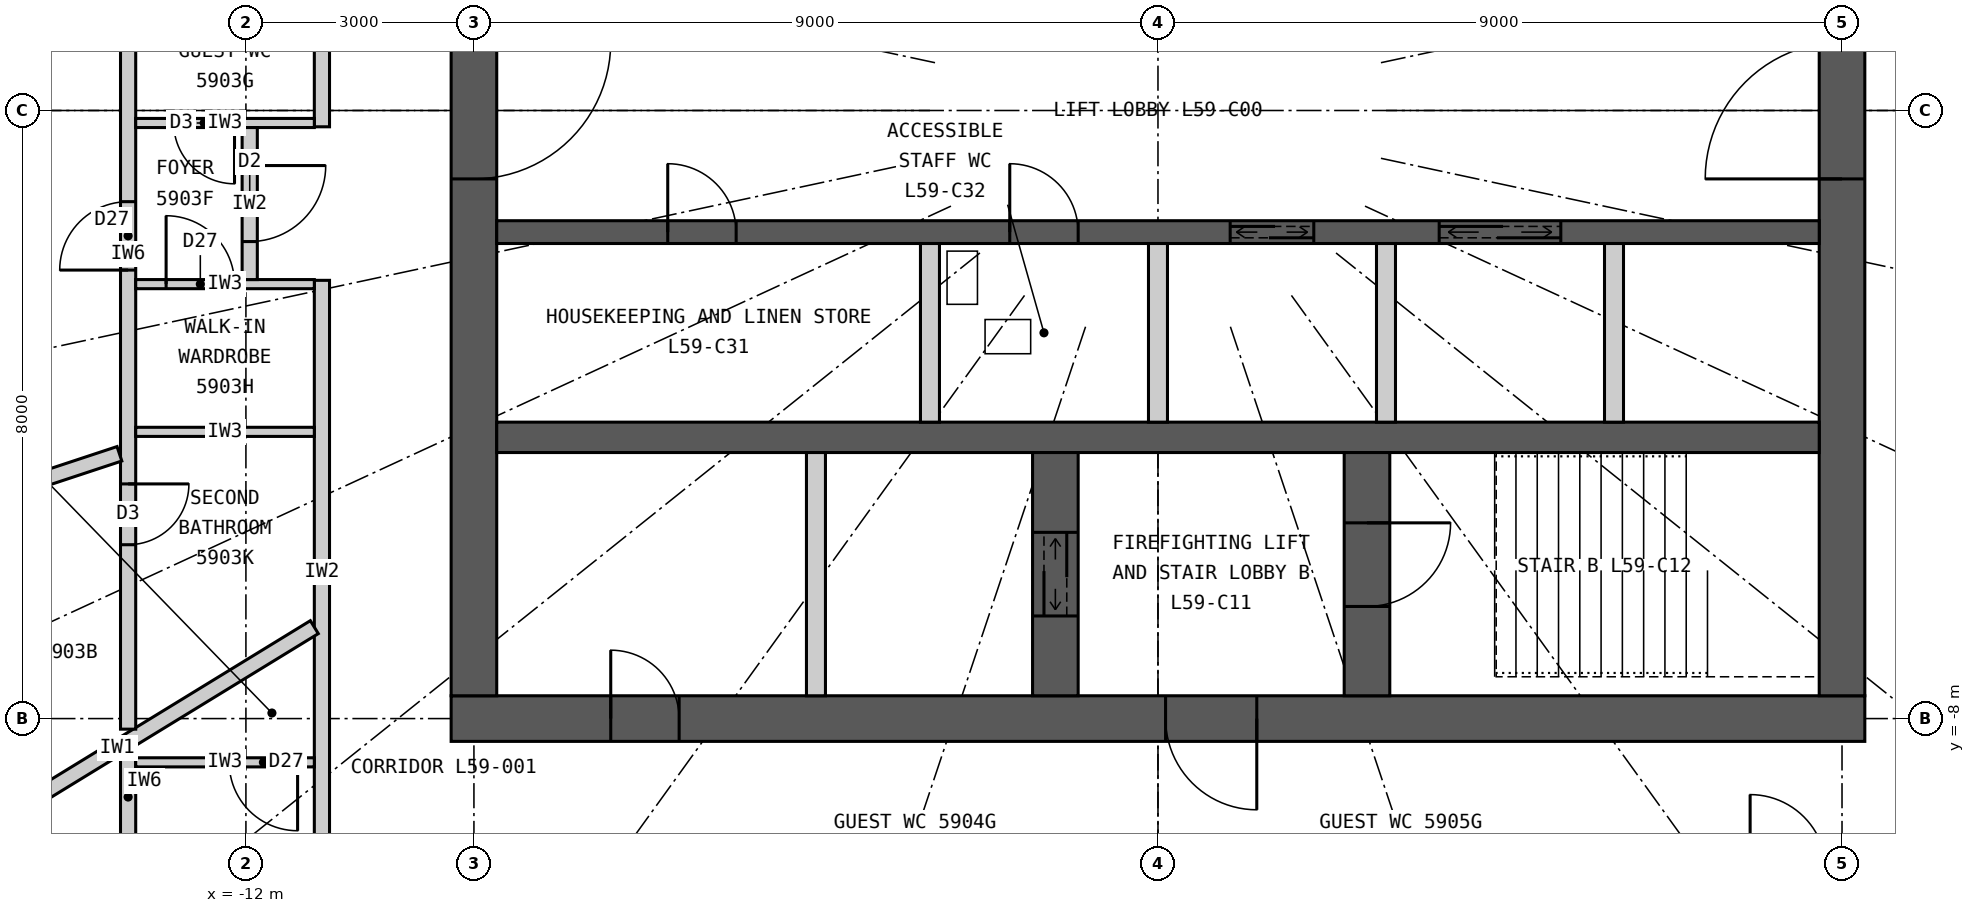
"""IFC4 building model, lengths in metres.
Left out: names, types, materials, properties, quantities, classifications, styles, units other than length and angle.
Written with IfcOpenShell. Run it as: python <this file> out.ifc"""

import sys

from ifc_helpers import new_model, si_unit, direction, frame, frame_2d, origin, place, context, subcontext, project, spatial, rectangle, extrude, element, fill, save


model = new_model("IFC4")
c1 = context("Model", 3, precision=1e-05, world=origin(), true_north=direction((0.0, 1.0)))
c2 = subcontext(c1, "Body", "Model", "MODEL_VIEW")
j1 = project(units=[si_unit("LENGTHUNIT", "METRE"), si_unit("PLANEANGLEUNIT", "RADIAN")], contexts=[c1])
p1 = place(None, origin())
s1 = spatial("IfcSite", under=j1, at=p1, CompositionType="ELEMENT")
p2 = place(p1, origin())
s2 = spatial("IfcBuilding", under=s1, at=p2, CompositionType="ELEMENT")
p3 = place(p2, frame((0.0, 0.0, 219.3)))
s3 = spatial("IfcBuildingStorey", under=s2, at=p3, CompositionType="ELEMENT", Elevation=219.3)
p4 = place(p3, frame((9.3, -8.0, 0.0), z_axis=(0.0, 0.0, 1.0), x_axis=(-1.0, 0.0, 0.0)))
e1 = element("IfcWall", 1, at=p4, inside=s3, PredefinedType="SHEAR", context=c2, shape_type="SweptSolid", body=[
    extrude(rectangle(XDim=18.6, YDim=0.6, at=frame_2d((9.3, 0.0))), origin(), (0.0, 0.0, 1.0), 3.3),
])
p5 = place(p4, frame((8.0, 0.0, 0.0)))
e2 = element("IfcOpeningElement", 2, at=p5, cuts=e1, PredefinedType="OPENING", context=c2, shape_type="SweptSolid", body=[
    extrude(rectangle(XDim=1.2, YDim=2.2, at=frame_2d((0.6, 1.1))), frame((0.0, 0.31, 0.0), z_axis=(0.0, -1.0, 0.0), x_axis=(1.0, 0.0, 0.0)), (0.0, 0.0, 1.0), 0.62),
])
p6 = place(p4, frame((15.6, 0.0, 0.0)))
e3 = element("IfcOpeningElement", 3, at=p6, cuts=e1, PredefinedType="OPENING", context=c2, shape_type="SweptSolid", body=[
    extrude(rectangle(XDim=0.9, YDim=2.2, at=frame_2d((0.45, 1.1))), frame((0.0, 0.31, 0.0), z_axis=(0.0, -1.0, 0.0), x_axis=(1.0, 0.0, 0.0)), (0.0, 0.0, 1.0), 0.62),
])
p7 = place(p3, frame((9.0, -7.7, 0.0), z_axis=(0.0, 0.0, 1.0), x_axis=(0.0, 1.0, 0.0)))
e4 = element("IfcWall", 4, at=p7, inside=s3, PredefinedType="SHEAR", context=c2, shape_type="SweptSolid", body=[
    extrude(rectangle(XDim=15.4, YDim=0.6, at=frame_2d((7.7, 0.0))), origin(), (0.0, 0.0, 1.0), 3.3),
])
p8 = place(p7, frame((6.8, 0.0, 0.0)))
e5 = element("IfcOpeningElement", 5, at=p8, cuts=e4, PredefinedType="OPENING", context=c2, shape_type="SweptSolid", body=[
    extrude(rectangle(XDim=1.8, YDim=2.2, at=frame_2d((0.9, 1.1))), frame((0.0, 0.31, 0.0), z_axis=(0.0, -1.0, 0.0), x_axis=(1.0, 0.0, 0.0)), (0.0, 0.0, 1.0), 0.62),
])
p9 = place(p3, frame((-9.0, 7.7, 0.0), z_axis=(0.0, 0.0, 1.0), x_axis=(0.0, -1.0, 0.0)))
e6 = element("IfcWall", 6, at=p9, inside=s3, PredefinedType="SHEAR", context=c2, shape_type="SweptSolid", body=[
    extrude(rectangle(XDim=15.4, YDim=0.6, at=frame_2d((7.7, 0.0))), origin(), (0.0, 0.0, 1.0), 3.3),
])
p10 = place(p9, frame((6.8, 0.0, 0.0)))
e7 = element("IfcOpeningElement", 7, at=p10, cuts=e6, PredefinedType="OPENING", context=c2, shape_type="SweptSolid", body=[
    extrude(rectangle(XDim=1.8, YDim=2.2, at=frame_2d((0.9, 1.1))), frame((0.0, 0.31, 0.0), z_axis=(0.0, -1.0, 0.0), x_axis=(1.0, 0.0, 0.0)), (0.0, 0.0, 1.0), 0.62),
])
p11 = place(p3, frame((-8.7, -4.3, 0.0), z_axis=(0.0, 0.0, 1.0), x_axis=(1.0, 0.0, 0.0)))
e8 = element("IfcWall", 8, at=p11, inside=s3, PredefinedType="SHEAR", context=c2, shape_type="SweptSolid", body=[
    extrude(rectangle(XDim=17.4, YDim=0.4, at=frame_2d((8.7, 0.0))), origin(), (0.0, 0.0, 1.0), 3.3),
])
p12 = place(p3, frame((-8.7, -1.6, 0.0), z_axis=(0.0, 0.0, 1.0), x_axis=(1.0, 0.0, 0.0)))
e9 = element("IfcWall", 9, at=p12, inside=s3, PredefinedType="SHEAR", context=c2, shape_type="SweptSolid", body=[
    extrude(rectangle(XDim=17.4, YDim=0.3, at=frame_2d((8.7, 0.0))), origin(), (0.0, 0.0, 1.0), 3.3),
])
p13 = place(p12, frame((9.65, 0.0, 0.0)))
e10 = element("IfcOpeningElement", 10, at=p13, cuts=e9, PredefinedType="OPENING", context=c2, shape_type="SweptSolid", body=[
    extrude(rectangle(XDim=1.1, YDim=2.2, at=frame_2d((0.55, 1.1))), frame((0.0, 0.16, 0.0), z_axis=(0.0, -1.0, 0.0), x_axis=(1.0, 0.0, 0.0)), (0.0, 0.0, 1.0), 0.32),
])
p14 = place(p12, frame((12.4, 0.0, 0.0)))
e11 = element("IfcOpeningElement", 11, at=p14, cuts=e9, PredefinedType="OPENING", context=c2, shape_type="SweptSolid", body=[
    extrude(rectangle(XDim=1.6, YDim=2.4, at=frame_2d((0.8, 1.2))), frame((0.0, 0.16, 0.0), z_axis=(0.0, -1.0, 0.0), x_axis=(1.0, 0.0, 0.0)), (0.0, 0.0, 1.0), 0.32),
])
p15 = place(p12, frame((2.25, 0.0, 0.0)))
e12 = element("IfcOpeningElement", 12, at=p15, cuts=e9, PredefinedType="OPENING", context=c2, shape_type="SweptSolid", body=[
    extrude(rectangle(XDim=0.9, YDim=2.2, at=frame_2d((0.45, 1.1))), frame((0.0, 0.16, 0.0), z_axis=(0.0, -1.0, 0.0), x_axis=(1.0, 0.0, 0.0)), (0.0, 0.0, 1.0), 0.32),
])
p16 = place(p12, frame((6.75, 0.0, 0.0)))
e13 = element("IfcOpeningElement", 13, at=p16, cuts=e9, PredefinedType="OPENING", context=c2, shape_type="SweptSolid", body=[
    extrude(rectangle(XDim=0.9, YDim=2.2, at=frame_2d((0.45, 1.1))), frame((0.0, 0.16, 0.0), z_axis=(0.0, -1.0, 0.0), x_axis=(1.0, 0.0, 0.0)), (0.0, 0.0, 1.0), 0.32),
])
p17 = place(p3, frame((2.75, -7.7, 0.0), z_axis=(0.0, 0.0, 1.0), x_axis=(0.0, 1.0, 0.0)))
e14 = element("IfcWall", 14, at=p17, inside=s3, PredefinedType="SHEAR", context=c2, shape_type="SweptSolid", body=[
    extrude(rectangle(XDim=3.2, YDim=0.6, at=frame_2d((1.6, 0.0))), origin(), (0.0, 0.0, 1.0), 3.3),
])
p18 = place(p17, frame((1.175, 0.0, 0.0)))
e15 = element("IfcOpeningElement", 15, at=p18, cuts=e14, PredefinedType="OPENING", context=c2, shape_type="SweptSolid", body=[
    extrude(rectangle(XDim=1.1, YDim=2.2, at=frame_2d((0.55, 1.1))), frame((0.0, 0.31, 0.0), z_axis=(0.0, -1.0, 0.0), x_axis=(1.0, 0.0, 0.0)), (0.0, 0.0, 1.0), 0.62),
])
p19 = place(p3, frame((-1.35, -7.7, 0.0), z_axis=(0.0, 0.0, 1.0), x_axis=(0.0, 1.0, 0.0)))
e16 = element("IfcWall", 16, at=p19, inside=s3, PredefinedType="SHEAR", context=c2, shape_type="SweptSolid", body=[
    extrude(rectangle(XDim=3.2, YDim=0.6, at=frame_2d((1.6, 0.0))), origin(), (0.0, 0.0, 1.0), 3.3),
])
p20 = place(p19, frame((1.05, 0.0, 0.0)))
e17 = element("IfcOpeningElement", 17, at=p20, cuts=e16, PredefinedType="OPENING", context=c2, shape_type="SweptSolid", body=[
    extrude(rectangle(XDim=1.1, YDim=2.2, at=frame_2d((0.55, 1.1))), frame((0.0, 0.31, 0.0), z_axis=(0.0, -1.0, 0.0), x_axis=(1.0, 0.0, 0.0)), (0.0, 0.0, 1.0), 0.62),
])
p21 = place(p3, frame((-4.5, -7.7, 0.0), z_axis=(0.0, 0.0, 1.0), x_axis=(0.0, 1.0, 0.0)))
e18 = element("IfcWall", 18, at=p21, inside=s3, PredefinedType="PARTITIONING", context=c2, shape_type="SweptSolid", body=[
    extrude(rectangle(XDim=3.2, YDim=0.25, at=frame_2d((1.6, 0.0))), origin(), (0.0, 0.0, 1.0), 3.3),
])
for number, where, z_axis, x_axis in (
    (19, (-3.0, -4.1, 0.0), (0.0, 0.0, 1.0), (0.0, 1.0, 0.0)),
    (20, (0.0, -4.1, 0.0), (0.0, 0.0, 1.0), (0.0, 1.0, 0.0)),
    (21, (3.0, -4.1, 0.0), (0.0, 0.0, 1.0), (0.0, 1.0, 0.0)),
    (22, (6.0, -4.1, 0.0), (0.0, 0.0, 1.0), (0.0, 1.0, 0.0)),
):
    element("IfcWall", number, at=place(p3, frame(where, z_axis=z_axis, x_axis=x_axis)), inside=s3, PredefinedType="PARTITIONING", context=c2, shape_type="SweptSolid", body=[
        extrude(rectangle(XDim=2.35, YDim=0.25, at=frame_2d((1.175, 0.0))), origin(), (0.0, 0.0, 1.0), 3.3),
    ])
p22 = place(p3, frame((-11.0, 9.9, 0.0), z_axis=(0.0, 0.0, 1.0), x_axis=(0.0, -1.0, 0.0)))
e23 = element("IfcWall", 23, at=p22, inside=s3, PredefinedType="PARTITIONING", context=c2, shape_type="SweptSolid", body=[
    extrude(rectangle(XDim=10.114, YDim=0.2, at=frame_2d((5.057, 0.0))), origin(), (0.0, 0.0, 1.0), 3.12),
])
p23 = place(p3, frame((-11.0, -2.234, 0.0), z_axis=(0.0, 0.0, 1.0), x_axis=(0.0, -1.0, 0.0)))
e24 = element("IfcWall", 24, at=p23, inside=s3, PredefinedType="PARTITIONING", context=c2, shape_type="SweptSolid", body=[
    extrude(rectangle(XDim=7.666, YDim=0.2, at=frame_2d((3.833, 0.0))), origin(), (0.0, 0.0, 1.0), 3.12),
])
p24 = place(p3, frame((-11.1, -6.797, 0.0), z_axis=(0.0, 0.0, 1.0), x_axis=(-0.852799818179, -0.522237943963, 0.0)))
e25 = element("IfcWall", 25, at=p24, inside=s3, PredefinedType="PARTITIONING", context=c2, shape_type="SweptSolid", body=[
    extrude(rectangle(XDim=6.077, YDim=0.2, at=frame_2d((3.039, 0.0))), origin(), (0.0, 0.0, 1.0), 3.12),
])
p25 = place(p3, frame((-13.55, 4.357, 0.0), z_axis=(0.0, 0.0, 1.0), x_axis=(0.0, -1.0, 0.0)))
e26 = element("IfcWall", 26, at=p25, inside=s3, PredefinedType="PARTITIONING", context=c2, shape_type="SweptSolid", body=[
    extrude(rectangle(XDim=12.496, YDim=0.2, at=frame_2d((6.248, 0.0))), origin(), (0.0, 0.0, 1.0), 3.12),
])
p26 = place(p25, frame((1.92, 0.0, 0.0)))
e27 = element("IfcOpeningElement", 27, at=p26, cuts=e26, PredefinedType="OPENING", context=c2, shape_type="SweptSolid", body=[
    extrude(rectangle(XDim=0.8, YDim=2.1, at=frame_2d((0.4, 1.05))), frame((0.0, 0.11, 0.0), z_axis=(0.0, -1.0, 0.0), x_axis=(1.0, 0.0, 0.0)), (0.0, 0.0, 1.0), 0.22),
])
p27 = place(p25, frame((9.27, 0.0, 0.0)))
e28 = element("IfcOpeningElement", 28, at=p27, cuts=e26, PredefinedType="OPENING", context=c2, shape_type="SweptSolid", body=[
    extrude(rectangle(XDim=0.8, YDim=2.1, at=frame_2d((0.4, 1.05))), frame((0.0, 0.11, 0.0), z_axis=(0.0, -1.0, 0.0), x_axis=(1.0, 0.0, 0.0)), (0.0, 0.0, 1.0), 0.22),
])
p28 = place(p25, frame((5.557, 0.0, 0.0)))
e29 = element("IfcOpeningElement", 29, at=p28, cuts=e26, PredefinedType="OPENING", context=c2, shape_type="SweptSolid", body=[
    extrude(rectangle(XDim=0.9, YDim=2.1, at=frame_2d((0.45, 1.05))), frame((0.0, 0.11, 0.0), z_axis=(0.0, -1.0, 0.0), x_axis=(1.0, 0.0, 0.0)), (0.0, 0.0, 1.0), 0.22),
])
p29 = place(p3, frame((-13.664, -4.516, 0.0), z_axis=(0.0, 0.0, 1.0), x_axis=(-0.949481375941, -0.313823384632, 0.0)))
e30 = element("IfcWall", 30, at=p29, inside=s3, PredefinedType="PARTITIONING", context=c2, shape_type="SweptSolid", body=[
    extrude(rectangle(XDim=5.638, YDim=0.2, at=frame_2d((2.819, 0.0))), origin(), (0.0, 0.0, 1.0), 3.12),
])
p30 = place(p29, frame((1.82, 0.0, 0.0)))
e31 = element("IfcOpeningElement", 31, at=p30, cuts=e30, PredefinedType="OPENING", context=c2, shape_type="SweptSolid", body=[
    extrude(rectangle(XDim=0.9, YDim=2.1, at=frame_2d((0.45, 1.05))), frame((0.0, 0.11, 0.0), z_axis=(0.0, -1.0, 0.0), x_axis=(1.0, 0.0, 0.0)), (0.0, 0.0, 1.0), 0.22),
])
p31 = place(p3, frame((-11.1, -0.164, 0.0), z_axis=(0.0, 0.0, 1.0), x_axis=(-1.0, 0.0, 0.0)))
e32 = element("IfcWall", 32, at=p31, inside=s3, PredefinedType="PARTITIONING", context=c2, shape_type="SweptSolid", body=[
    extrude(rectangle(XDim=2.35, YDim=0.12, at=frame_2d((1.175, 0.0))), origin(), (0.0, 0.0, 1.0), 3.12),
])
p32 = place(p31, frame((1.05, 0.0, 0.0)))
e33 = element("IfcOpeningElement", 33, at=p32, cuts=e32, PredefinedType="OPENING", context=c2, shape_type="SweptSolid", body=[
    extrude(rectangle(XDim=0.8, YDim=2.1, at=frame_2d((0.4, 1.05))), frame((0.0, 0.07, 0.0), z_axis=(0.0, -1.0, 0.0), x_axis=(1.0, 0.0, 0.0)), (0.0, 0.0, 1.0), 0.14),
])
p33 = place(p3, frame((-11.1, -2.284, 0.0), z_axis=(0.0, 0.0, 1.0), x_axis=(-1.0, 0.0, 0.0)))
e34 = element("IfcWall", 34, at=p33, inside=s3, PredefinedType="PARTITIONING", context=c2, shape_type="SweptSolid", body=[
    extrude(rectangle(XDim=2.35, YDim=0.12, at=frame_2d((1.175, 0.0))), origin(), (0.0, 0.0, 1.0), 3.12),
])
p34 = place(p33, frame((1.05, 0.0, 0.0)))
e35 = element("IfcOpeningElement", 35, at=p34, cuts=e34, PredefinedType="OPENING", context=c2, shape_type="SweptSolid", body=[
    extrude(rectangle(XDim=0.9, YDim=2.1, at=frame_2d((0.45, 1.05))), frame((0.0, 0.07, 0.0), z_axis=(0.0, -1.0, 0.0), x_axis=(1.0, 0.0, 0.0)), (0.0, 0.0, 1.0), 0.14),
])
p35 = place(p3, frame((-11.1, -4.228, 0.0), z_axis=(0.0, 0.0, 1.0), x_axis=(-1.0, 0.0, 0.0)))
e36 = element("IfcWall", 36, at=p35, inside=s3, PredefinedType="PARTITIONING", context=c2, shape_type="SweptSolid", body=[
    extrude(rectangle(XDim=2.35, YDim=0.12, at=frame_2d((1.175, 0.0))), origin(), (0.0, 0.0, 1.0), 3.12),
])
p36 = place(p3, frame((-11.95, -0.224, 0.0), z_axis=(0.0, 0.0, 1.0), x_axis=(0.0, -1.0, 0.0)))
e37 = element("IfcWall", 37, at=p36, inside=s3, PredefinedType="PARTITIONING", context=c2, shape_type="SweptSolid", body=[
    extrude(rectangle(XDim=2.0, YDim=0.2, at=frame_2d((1.0, 0.0))), origin(), (0.0, 0.0, 1.0), 3.12),
])
p37 = place(p36, frame((0.5, 0.0, 0.0)))
e38 = element("IfcOpeningElement", 38, at=p37, cuts=e37, PredefinedType="OPENING", context=c2, shape_type="SweptSolid", body=[
    extrude(rectangle(XDim=1.0, YDim=2.2, at=frame_2d((0.5, 1.1))), frame((0.0, 0.11, 0.0), z_axis=(0.0, -1.0, 0.0), x_axis=(1.0, 0.0, 0.0)), (0.0, 0.0, 1.0), 0.22),
])
p38 = place(p3, frame((-13.55, -8.456, 0.0), z_axis=(0.0, 0.0, 1.0), x_axis=(0.0, -1.0, 0.0)))
e39 = element("IfcWall", 39, at=p38, inside=s3, PredefinedType="PARTITIONING", context=c2, shape_type="SweptSolid", body=[
    extrude(rectangle(XDim=1.153, YDim=0.2, at=frame_2d((0.576, 0.0))), origin(), (0.0, 0.0, 1.0), 3.12),
])
p39 = place(p3, frame((-11.1, -8.576, 0.0), z_axis=(0.0, 0.0, 1.0), x_axis=(-1.0, 0.0, 0.0)))
e40 = element("IfcWall", 40, at=p39, inside=s3, PredefinedType="PARTITIONING", context=c2, shape_type="SweptSolid", body=[
    extrude(rectangle(XDim=2.35, YDim=0.12, at=frame_2d((1.175, 0.0))), origin(), (0.0, 0.0, 1.0), 3.12),
])
p40 = place(p39, frame((0.22, 0.0, 0.0)))
e41 = element("IfcOpeningElement", 41, at=p40, cuts=e40, PredefinedType="OPENING", context=c2, shape_type="SweptSolid", body=[
    extrude(rectangle(XDim=0.9, YDim=2.1, at=frame_2d((0.45, 1.05))), frame((0.0, 0.07, 0.0), z_axis=(0.0, -1.0, 0.0), x_axis=(1.0, 0.0, 0.0)), (0.0, 0.0, 1.0), 0.14),
])
p41 = place(p37, origin())
e42 = element("IfcDoor", 42, at=p41, inside=s3, OperationType="SINGLE_SWING_LEFT", PredefinedType="DOOR", context=c2, shape_type="SweptSolid", body=[
    extrude(rectangle(XDim=1.0, YDim=2.2, at=frame_2d((0.5, 1.1))), frame((0.0, 0.025, 0.0), z_axis=(0.0, -1.0, 0.0), x_axis=(1.0, 0.0, 0.0)), (0.0, 0.0, 1.0), 0.05),
])
fill(e38, e42)
p42 = place(p32, origin())
e43 = element("IfcDoor", 43, at=p42, inside=s3, OperationType="SINGLE_SWING_LEFT", PredefinedType="DOOR", context=c2, shape_type="SweptSolid", body=[
    extrude(rectangle(XDim=0.8, YDim=2.1, at=frame_2d((0.4, 1.05))), frame((0.0, 0.025, 0.0), z_axis=(0.0, -1.0, 0.0), x_axis=(1.0, 0.0, 0.0)), (0.0, 0.0, 1.0), 0.05),
])
fill(e33, e43)
p43 = place(p34, origin())
e44 = element("IfcDoor", 44, at=p43, inside=s3, OperationType="SINGLE_SWING_RIGHT", PredefinedType="DOOR", context=c2, shape_type="SweptSolid", body=[
    extrude(rectangle(XDim=0.9, YDim=2.1, at=frame_2d((0.45, 1.05))), frame((0.0, 0.025, 0.0), z_axis=(0.0, -1.0, 0.0), x_axis=(1.0, 0.0, 0.0)), (0.0, 0.0, 1.0), 0.05),
])
fill(e35, e44)
p44 = place(p27, origin())
e45 = element("IfcDoor", 45, at=p44, inside=s3, OperationType="SINGLE_SWING_LEFT", PredefinedType="DOOR", context=c2, shape_type="SweptSolid", body=[
    extrude(rectangle(XDim=0.8, YDim=2.1, at=frame_2d((0.4, 1.05))), frame((0.0, 0.025, 0.0), z_axis=(0.0, -1.0, 0.0), x_axis=(1.0, 0.0, 0.0)), (0.0, 0.0, 1.0), 0.05),
])
fill(e28, e45)
p45 = place(p28, origin())
e46 = element("IfcDoor", 46, at=p45, inside=s3, OperationType="SINGLE_SWING_RIGHT", PredefinedType="DOOR", context=c2, shape_type="SweptSolid", body=[
    extrude(rectangle(XDim=0.9, YDim=2.1, at=frame_2d((0.45, 1.05))), frame((0.0, 0.025, 0.0), z_axis=(0.0, -1.0, 0.0), x_axis=(1.0, 0.0, 0.0)), (0.0, 0.0, 1.0), 0.05),
])
fill(e29, e46)
p46 = place(p40, origin())
e47 = element("IfcDoor", 47, at=p46, inside=s3, OperationType="SINGLE_SWING_LEFT", PredefinedType="DOOR", context=c2, shape_type="SweptSolid", body=[
    extrude(rectangle(XDim=0.9, YDim=2.1, at=frame_2d((0.45, 1.05))), frame((0.0, 0.025, 0.0), z_axis=(0.0, -1.0, 0.0), x_axis=(1.0, 0.0, 0.0)), (0.0, 0.0, 1.0), 0.05),
])
fill(e41, e47)
p47 = place(p5, origin())
e48 = element("IfcDoor", 48, at=p47, inside=s3, OperationType="SINGLE_SWING_LEFT", PredefinedType="DOOR", context=c2, shape_type="SweptSolid", body=[
    extrude(rectangle(XDim=1.2, YDim=2.2, at=frame_2d((0.6, 1.1))), frame((0.0, 0.025, 0.0), z_axis=(0.0, -1.0, 0.0), x_axis=(1.0, 0.0, 0.0)), (0.0, 0.0, 1.0), 0.05),
])
fill(e2, e48)
p48 = place(p18, origin())
e49 = element("IfcDoor", 49, at=p48, inside=s3, OperationType="SINGLE_SWING_RIGHT", PredefinedType="DOOR", context=c2, shape_type="SweptSolid", body=[
    extrude(rectangle(XDim=1.1, YDim=2.2, at=frame_2d((0.55, 1.1))), frame((0.0, 0.025, 0.0), z_axis=(0.0, -1.0, 0.0), x_axis=(1.0, 0.0, 0.0)), (0.0, 0.0, 1.0), 0.05),
])
fill(e15, e49)
p49 = place(p20, origin())
e50 = element("IfcDoor", 50, at=p49, inside=s3, OperationType="DOUBLE_DOOR_SLIDING", PredefinedType="DOOR", context=c2, shape_type="SweptSolid", body=[
    extrude(rectangle(XDim=1.1, YDim=2.2, at=frame_2d((0.55, 1.1))), frame((0.0, 0.025, 0.0), z_axis=(0.0, -1.0, 0.0), x_axis=(1.0, 0.0, 0.0)), (0.0, 0.0, 1.0), 0.05),
])
fill(e17, e50)
p50 = place(p6, origin())
e51 = element("IfcDoor", 51, at=p50, inside=s3, OperationType="SINGLE_SWING_RIGHT", PredefinedType="DOOR", context=c2, shape_type="SweptSolid", body=[
    extrude(rectangle(XDim=0.9, YDim=2.2, at=frame_2d((0.45, 1.1))), frame((0.0, 0.025, 0.0), z_axis=(0.0, -1.0, 0.0), x_axis=(1.0, 0.0, 0.0)), (0.0, 0.0, 1.0), 0.05),
])
fill(e3, e51)
p51 = place(p13, origin())
e52 = element("IfcDoor", 52, at=p51, inside=s3, OperationType="DOUBLE_DOOR_SLIDING", PredefinedType="DOOR", context=c2, shape_type="SweptSolid", body=[
    extrude(rectangle(XDim=1.1, YDim=2.2, at=frame_2d((0.55, 1.1))), frame((0.0, 0.025, 0.0), z_axis=(0.0, -1.0, 0.0), x_axis=(1.0, 0.0, 0.0)), (0.0, 0.0, 1.0), 0.05),
])
fill(e10, e52)
p52 = place(p14, origin())
e53 = element("IfcDoor", 53, at=p52, inside=s3, OperationType="DOUBLE_DOOR_SLIDING", PredefinedType="DOOR", context=c2, shape_type="SweptSolid", body=[
    extrude(rectangle(XDim=1.6, YDim=2.4, at=frame_2d((0.8, 1.2))), frame((0.0, 0.025, 0.0), z_axis=(0.0, -1.0, 0.0), x_axis=(1.0, 0.0, 0.0)), (0.0, 0.0, 1.0), 0.05),
])
fill(e11, e53)
p53 = place(p15, origin())
e54 = element("IfcDoor", 54, at=p53, inside=s3, OperationType="SINGLE_SWING_LEFT", PredefinedType="DOOR", context=c2, shape_type="SweptSolid", body=[
    extrude(rectangle(XDim=0.9, YDim=2.2, at=frame_2d((0.45, 1.1))), frame((0.0, 0.025, 0.0), z_axis=(0.0, -1.0, 0.0), x_axis=(1.0, 0.0, 0.0)), (0.0, 0.0, 1.0), 0.05),
])
fill(e12, e54)
p54 = place(p16, origin())
e55 = element("IfcDoor", 55, at=p54, inside=s3, OperationType="SINGLE_SWING_LEFT", PredefinedType="DOOR", context=c2, shape_type="SweptSolid", body=[
    extrude(rectangle(XDim=0.9, YDim=2.2, at=frame_2d((0.45, 1.1))), frame((0.0, 0.025, 0.0), z_axis=(0.0, -1.0, 0.0), x_axis=(1.0, 0.0, 0.0)), (0.0, 0.0, 1.0), 0.05),
])
fill(e13, e55)
p55 = place(p8, origin())
e56 = element("IfcDoor", 56, at=p55, inside=s3, OperationType="DOUBLE_DOOR_DOUBLE_SWING", PredefinedType="DOOR", context=c2, shape_type="SweptSolid", body=[
    extrude(rectangle(XDim=1.8, YDim=2.2, at=frame_2d((0.9, 1.1))), frame((0.0, 0.025, 0.0), z_axis=(0.0, -1.0, 0.0), x_axis=(1.0, 0.0, 0.0)), (0.0, 0.0, 1.0), 0.05),
])
fill(e5, e56)
p56 = place(p10, origin())
e57 = element("IfcDoor", 57, at=p56, inside=s3, OperationType="DOUBLE_DOOR_DOUBLE_SWING", PredefinedType="DOOR", context=c2, shape_type="SweptSolid", body=[
    extrude(rectangle(XDim=1.8, YDim=2.2, at=frame_2d((0.9, 1.1))), frame((0.0, 0.025, 0.0), z_axis=(0.0, -1.0, 0.0), x_axis=(1.0, 0.0, 0.0)), (0.0, 0.0, 1.0), 0.05),
])
fill(e7, e57)
save(model, sys.argv[1])
